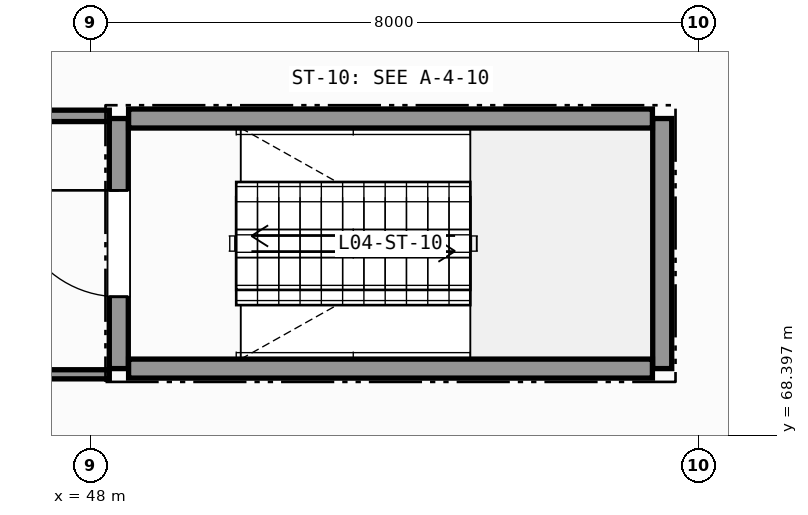
"""IFC4 building model, lengths in metres.
Left out: names, types, materials, properties, quantities, classifications, styles, units other than length and angle.
Written with IfcOpenShell. Run it as: python <this file> out.ifc"""

import sys

from ifc_helpers import new_model, si_unit, direction, frame, frame_2d, origin, place, context, subcontext, project, spatial, rectangle, extrude, element, fill, save


model = new_model("IFC4")
c1 = context("Model", 3, precision=1e-05, world=origin(), true_north=direction((0.0, 1.0)))
c2 = subcontext(c1, "Body", "Model", "MODEL_VIEW")
j1 = project(units=[si_unit("LENGTHUNIT", "METRE"), si_unit("PLANEANGLEUNIT", "RADIAN")], contexts=[c1])
p1 = place(None, origin())
s1 = spatial("IfcSite", under=j1, at=p1, CompositionType="ELEMENT")
p2 = place(p1, origin())
s2 = spatial("IfcBuilding", under=s1, at=p2, CompositionType="ELEMENT")
p3 = place(p2, frame((0.0, 0.0, 18.0)))
s3 = spatial("IfcBuildingStorey", under=s2, at=p3, CompositionType="ELEMENT", Elevation=18.0)
p4 = place(p3, frame((48.375, 69.275, 0.0), z_axis=(0.0, 0.0, 1.0), x_axis=(0.0, 1.0, 0.0)))
e1 = element("IfcWall", 1, at=p4, inside=s3, PredefinedType="SHEAR", context=c2, shape_type="SweptSolid", body=[
    extrude(rectangle(XDim=3.29, YDim=0.25, at=frame_2d((1.645, 0.0))), origin(), (0.0, 0.0, 1.0), 3.98),
])
p5 = place(p4, frame((0.945, 0.0, 0.0)))
e2 = element("IfcOpeningElement", 2, at=p5, cuts=e1, PredefinedType="OPENING", context=c2, shape_type="SweptSolid", body=[
    extrude(rectangle(XDim=1.4, YDim=2.2, at=frame_2d((0.7, 1.1))), frame((0.0, 0.135, 0.0), z_axis=(0.0, -1.0, 0.0), x_axis=(1.0, 0.0, 0.0)), (0.0, 0.0, 1.0), 0.27),
])
p6 = place(p3, frame((55.525, 69.275, 0.0), z_axis=(0.0, 0.0, 1.0), x_axis=(0.0, 1.0, 0.0)))
e3 = element("IfcWall", 3, at=p6, inside=s3, PredefinedType="SHEAR", context=c2, shape_type="SweptSolid", body=[
    extrude(rectangle(XDim=3.29, YDim=0.25, at=frame_2d((1.645, 0.0))), origin(), (0.0, 0.0, 1.0), 3.98),
])
for number, where, z_axis, x_axis in (
    (4, (48.504, 69.275, 0.0), (0.0, 0.0, 1.0), (1.0, 0.0, 0.0)),
    (5, (48.504, 72.565, 0.0), (0.0, 0.0, 1.0), (1.0, 0.0, 0.0)),
):
    element("IfcWall", number, at=place(p3, frame(where, z_axis=z_axis, x_axis=x_axis)), inside=s3, PredefinedType="SHEAR", context=c2, shape_type="SweptSolid", body=[
        extrude(rectangle(XDim=6.892, YDim=0.25, at=frame_2d((3.446, 0.0))), origin(), (0.0, 0.0, 1.0), 3.98),
    ])
p7 = place(p3, frame((43.664, 72.6, 0.0), z_axis=(0.0, 0.0, 1.0), x_axis=(1.0, 0.0, 0.0)))
e6 = element("IfcWall", 6, at=p7, inside=s3, PredefinedType="PARTITIONING", context=c2, shape_type="SweptSolid", body=[
    extrude(rectangle(XDim=4.586, YDim=0.15, at=frame_2d((2.293, 0.0))), origin(), (0.0, 0.0, 1.0), 3.98),
])
p8 = place(p7, frame((1.393, 0.0, 0.0)))
e7 = element("IfcOpeningElement", 7, at=p8, cuts=e6, PredefinedType="OPENING", context=c2, shape_type="SweptSolid", body=[
    extrude(rectangle(XDim=1.8, YDim=2.4, at=frame_2d((0.9, 1.2))), frame((0.0, 0.085, 0.0), z_axis=(0.0, -1.0, 0.0), x_axis=(1.0, 0.0, 0.0)), (0.0, 0.0, 1.0), 0.17),
])
p9 = place(p3, frame((43.684, 69.2, 0.0), z_axis=(0.0, 0.0, 1.0), x_axis=(1.0, 0.0, 0.0)))
e8 = element("IfcWall", 8, at=p9, inside=s3, PredefinedType="PARTITIONING", context=c2, shape_type="SweptSolid", body=[
    extrude(rectangle(XDim=4.566, YDim=0.12, at=frame_2d((2.283, 0.0))), origin(), (0.0, 0.0, 1.0), 3.98),
])
p10 = place(p9, frame((1.383, 0.0, 0.0)))
e9 = element("IfcOpeningElement", 9, at=p10, cuts=e8, PredefinedType="OPENING", context=c2, shape_type="SweptSolid", body=[
    extrude(rectangle(XDim=1.8, YDim=2.4, at=frame_2d((0.9, 1.2))), frame((0.0, 0.07, 0.0), z_axis=(0.0, -1.0, 0.0), x_axis=(1.0, 0.0, 0.0)), (0.0, 0.0, 1.0), 0.14),
])
p11 = place(p5, origin())
e10 = element("IfcDoor", 10, at=p11, inside=s3, OperationType="SINGLE_SWING_RIGHT", PredefinedType="DOOR", context=c2, shape_type="SweptSolid", body=[
    extrude(rectangle(XDim=1.4, YDim=2.2, at=frame_2d((0.7, 1.1))), frame((0.0, 0.025, 0.0), z_axis=(0.0, -1.0, 0.0), x_axis=(1.0, 0.0, 0.0)), (0.0, 0.0, 1.0), 0.05),
])
fill(e2, e10)
save(model, sys.argv[1])
